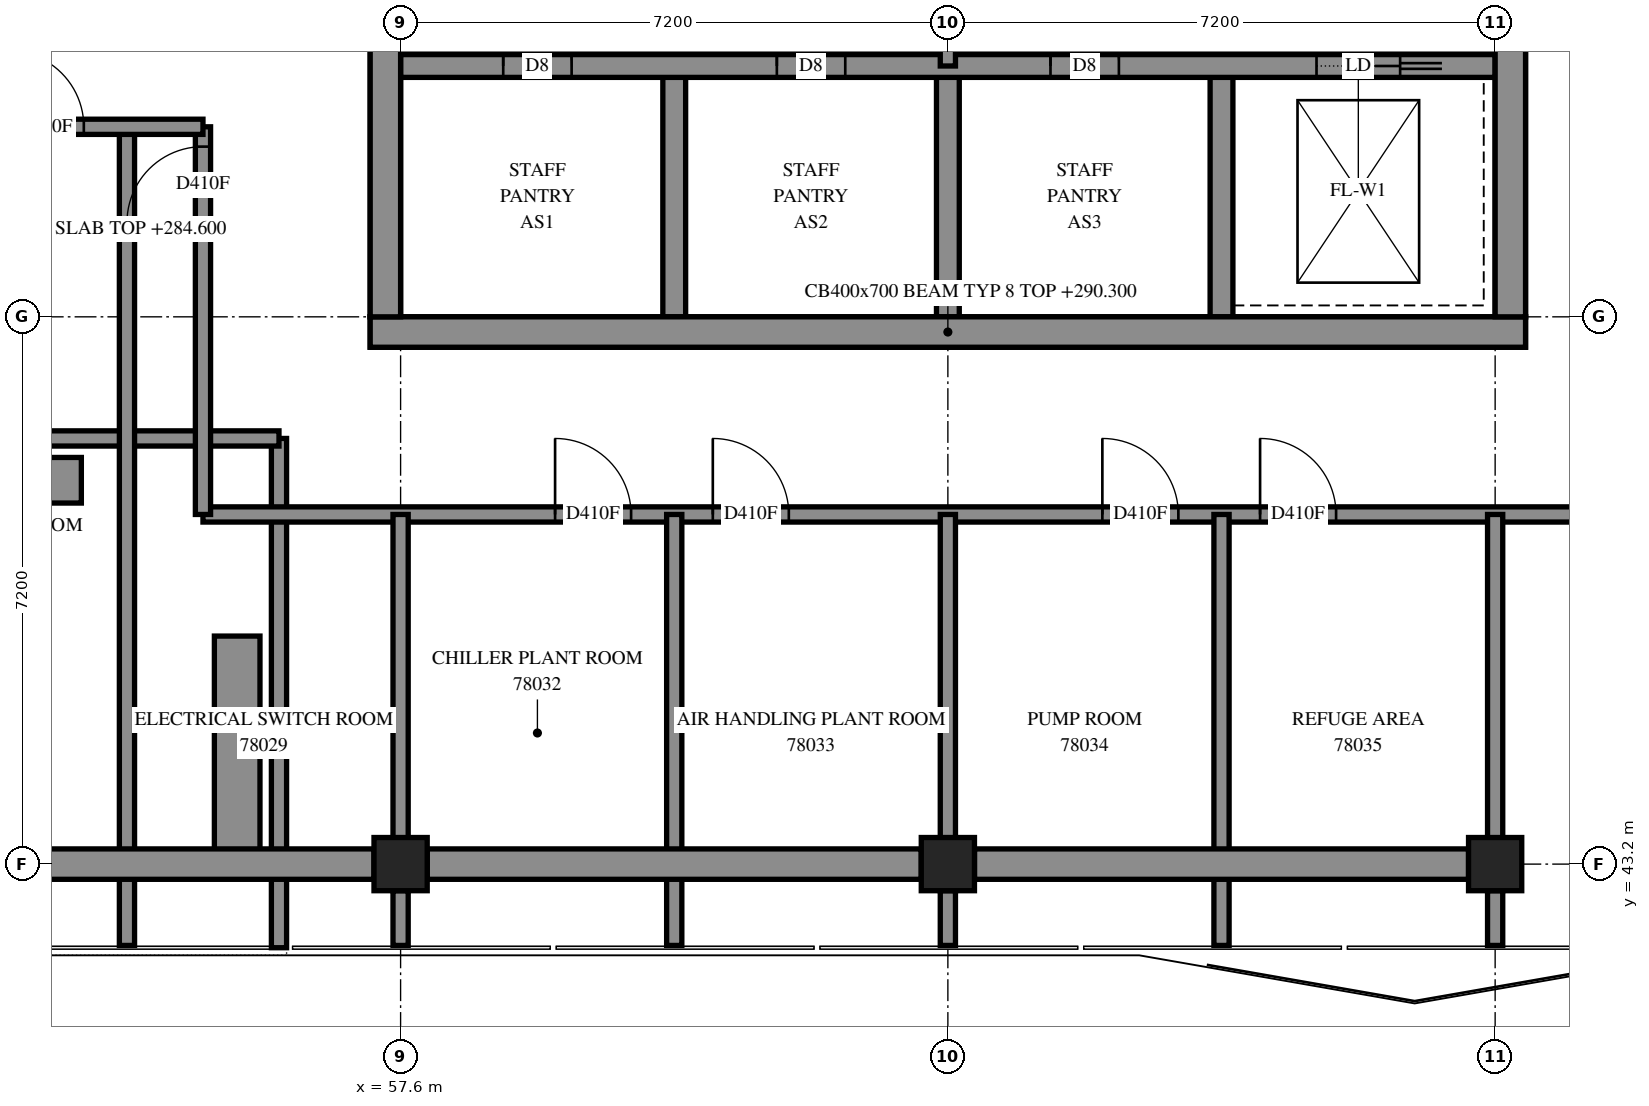
"""IFC4 building model, lengths in metres.
Left out: names, types, materials, properties, quantities, classifications, styles, units other than length and angle.
Written with IfcOpenShell. Run it as: python <this file> out.ifc"""

import sys

from ifc_helpers import new_model, si_unit, direction, frame, frame_2d, origin, origin_2d, place, context, subcontext, project, spatial, polyline, rectangle, outline, extrude, element, fill, save


model = new_model("IFC4")
c1 = context("Model", 3, precision=1e-05, world=origin(), true_north=direction((0.0, 1.0)))
c2 = subcontext(c1, "Body", "Model", "MODEL_VIEW")
j1 = project(units=[si_unit("LENGTHUNIT", "METRE"), si_unit("PLANEANGLEUNIT", "RADIAN")], contexts=[c1])
p1 = place(None, origin())
s1 = spatial("IfcSite", under=j1, at=p1, CompositionType="ELEMENT")
p2 = place(p1, origin())
s2 = spatial("IfcBuilding", under=s1, at=p2, CompositionType="ELEMENT")
p3 = place(p2, frame((0.0, 0.0, 284.6)))
s3 = spatial("IfcBuildingStorey", under=s2, at=p3, CompositionType="ELEMENT", Elevation=284.6)
for number, where, z_axis, x_axis in (
    (1, (57.6, 43.2, 0.0), (0.0, 0.0, 1.0), (1.0, 0.0, 0.0)),
    (2, (64.8, 43.2, 0.0), (0.0, 0.0, 1.0), (1.0, 0.0, 0.0)),
    (3, (72.0, 43.2, 0.0), (0.0, 0.0, 1.0), (1.0, 0.0, 0.0)),
):
    element("IfcColumn", number, at=place(p3, frame(where, z_axis=z_axis, x_axis=x_axis)), inside=s3, PredefinedType="COLUMN", context=c2, shape_type="SweptSolid", body=[
        extrude(rectangle(XDim=0.7, YDim=0.7, at=origin_2d()), origin(), (0.0, 0.0, 1.0), 5.7),
    ])
p4 = place(p3, frame((57.2, 50.2, -0.3), z_axis=(0.0, 0.0, 1.0), x_axis=(1.0, 0.0, 0.0)))
e4 = element("IfcWall", 4, at=p4, inside=s3, PredefinedType="SHEAR", context=c2, shape_type="SweptSolid", body=[
    extrude(rectangle(XDim=15.2, YDim=0.4, at=frame_2d((7.6, 0.0))), origin(), (0.0, 0.0, 1.0), 5.3),
])
p5 = place(p3, frame((57.4, 50.4, -0.3), z_axis=(0.0, 0.0, 1.0), x_axis=(0.0, 1.0, 0.0)))
e5 = element("IfcWall", 5, at=p5, inside=s3, PredefinedType="SHEAR", context=c2, shape_type="SweptSolid", body=[
    extrude(rectangle(XDim=14.4, YDim=0.4, at=frame_2d((7.2, 0.0))), origin(), (0.0, 0.0, 1.0), 5.3),
])
p6 = place(p5, frame((4.55, 0.0, 0.3)))
e6 = element("IfcOpeningElement", 6, at=p6, cuts=e5, PredefinedType="OPENING", context=c2, shape_type="SweptSolid", body=[
    extrude(rectangle(XDim=1.1, YDim=2.1, at=frame_2d((0.55, 1.05))), frame((0.0, 0.21, 0.0), z_axis=(0.0, -1.0, 0.0), x_axis=(1.0, 0.0, 0.0)), (0.0, 0.0, 1.0), 0.42),
])
p7 = place(p5, frame((11.35, 0.0, 0.3)))
e7 = element("IfcOpeningElement", 7, at=p7, cuts=e5, PredefinedType="OPENING", context=c2, shape_type="SweptSolid", body=[
    extrude(rectangle(XDim=1.1, YDim=2.1, at=frame_2d((0.55, 1.05))), frame((0.0, 0.21, 0.0), z_axis=(0.0, -1.0, 0.0), x_axis=(1.0, 0.0, 0.0)), (0.0, 0.0, 1.0), 0.42),
])
p8 = place(p3, frame((72.2, 50.4, -0.3), z_axis=(0.0, 0.0, 1.0), x_axis=(0.0, 1.0, 0.0)))
e8 = element("IfcWall", 8, at=p8, inside=s3, PredefinedType="SHEAR", context=c2, shape_type="SweptSolid", body=[
    extrude(rectangle(XDim=14.4, YDim=0.4, at=frame_2d((7.2, 0.0))), origin(), (0.0, 0.0, 1.0), 5.3),
])
p9 = place(p8, frame((4.55, 0.0, 0.3)))
e9 = element("IfcOpeningElement", 9, at=p9, cuts=e8, PredefinedType="OPENING", context=c2, shape_type="SweptSolid", body=[
    extrude(rectangle(XDim=1.1, YDim=2.1, at=frame_2d((0.55, 1.05))), frame((0.0, 0.21, 0.0), z_axis=(0.0, -1.0, 0.0), x_axis=(1.0, 0.0, 0.0)), (0.0, 0.0, 1.0), 0.42),
])
p10 = place(p8, frame((11.35, 0.0, 0.3)))
e10 = element("IfcOpeningElement", 10, at=p10, cuts=e8, PredefinedType="OPENING", context=c2, shape_type="SweptSolid", body=[
    extrude(rectangle(XDim=1.1, YDim=2.1, at=frame_2d((0.55, 1.05))), frame((0.0, 0.21, 0.0), z_axis=(0.0, -1.0, 0.0), x_axis=(1.0, 0.0, 0.0)), (0.0, 0.0, 1.0), 0.42),
])
for number, where, z_axis, x_axis in (
    (11, (61.2, 50.4, 0.0), (0.0, 0.0, 1.0), (0.0, 1.0, 0.0)),
    (12, (64.8, 50.4, 0.0), (0.0, 0.0, 1.0), (0.0, 1.0, 0.0)),
    (13, (68.4, 50.4, 0.0), (0.0, 0.0, 1.0), (0.0, 1.0, 0.0)),
):
    element("IfcWall", number, at=place(p3, frame(where, z_axis=z_axis, x_axis=x_axis)), inside=s3, PredefinedType="SOLIDWALL", context=c2, shape_type="SweptSolid", body=[
        extrude(rectangle(XDim=3.3, YDim=0.3, at=frame_2d((1.65, 0.0))), origin(), (0.0, 0.0, 1.0), 5.7),
    ])
p11 = place(p3, frame((57.6, 53.7, 0.0), z_axis=(0.0, 0.0, 1.0), x_axis=(1.0, 0.0, 0.0)))
e14 = element("IfcWall", 14, at=p11, inside=s3, PredefinedType="SOLIDWALL", context=c2, shape_type="SweptSolid", body=[
    extrude(rectangle(XDim=14.4, YDim=0.3, at=frame_2d((7.2, 0.0))), origin(), (0.0, 0.0, 1.0), 5.7),
])
p12 = place(p11, frame((1.35, 0.0, 0.0)))
e15 = element("IfcOpeningElement", 15, at=p12, cuts=e14, PredefinedType="OPENING", context=c2, shape_type="SweptSolid", body=[
    extrude(rectangle(XDim=0.9, YDim=2.1, at=frame_2d((0.45, 1.05))), frame((0.0, 0.16, 0.0), z_axis=(0.0, -1.0, 0.0), x_axis=(1.0, 0.0, 0.0)), (0.0, 0.0, 1.0), 0.32),
])
p13 = place(p11, frame((4.95, 0.0, 0.0)))
e16 = element("IfcOpeningElement", 16, at=p13, cuts=e14, PredefinedType="OPENING", context=c2, shape_type="SweptSolid", body=[
    extrude(rectangle(XDim=0.9, YDim=2.1, at=frame_2d((0.45, 1.05))), frame((0.0, 0.16, 0.0), z_axis=(0.0, -1.0, 0.0), x_axis=(1.0, 0.0, 0.0)), (0.0, 0.0, 1.0), 0.32),
])
p14 = place(p11, frame((8.55, 0.0, 0.0)))
e17 = element("IfcOpeningElement", 17, at=p14, cuts=e14, PredefinedType="OPENING", context=c2, shape_type="SweptSolid", body=[
    extrude(rectangle(XDim=0.9, YDim=2.1, at=frame_2d((0.45, 1.05))), frame((0.0, 0.16, 0.0), z_axis=(0.0, -1.0, 0.0), x_axis=(1.0, 0.0, 0.0)), (0.0, 0.0, 1.0), 0.32),
])
p15 = place(p11, frame((12.05, 0.0, 0.0)))
e18 = element("IfcOpeningElement", 18, at=p15, cuts=e14, PredefinedType="OPENING", context=c2, shape_type="SweptSolid", body=[
    extrude(rectangle(XDim=1.1, YDim=2.1, at=frame_2d((0.55, 1.05))), frame((0.0, 0.16, 0.0), z_axis=(0.0, -1.0, 0.0), x_axis=(1.0, 0.0, 0.0)), (0.0, 0.0, 1.0), 0.32),
])
p16 = place(p3, frame((56.0, 42.1, 0.0), z_axis=(0.0, 0.0, 1.0), x_axis=(0.0, 1.0, 0.0)))
e19 = element("IfcWall", 19, at=p16, inside=s3, PredefinedType="PARAPET", context=c2, shape_type="SweptSolid", body=[
    extrude(outline(polyline([(0.0, -0.1), (6.8, -0.1), (6.6, 0.1), (0.0, 0.1), (0.0, -0.1)])), origin(), (0.0, 0.0, 1.0), 0.25),
])
p17 = place(p3, frame((56.0, 48.8, 0.0), z_axis=(0.0, 0.0, 1.0), x_axis=(-1.0, 0.0, 0.0)))
e20 = element("IfcWall", 20, at=p17, inside=s3, PredefinedType="PARAPET", context=c2, shape_type="SweptSolid", body=[
    extrude(outline(polyline([(-0.1, -0.1), (6.7, -0.1), (6.7, 0.1), (0.1, 0.1), (-0.1, -0.1)])), origin(), (0.0, 0.0, 1.0), 0.25),
])
p18 = place(p3, frame((55.45, 43.25, 0.0), z_axis=(0.0, 0.0, 1.0), x_axis=(0.0, 1.0, 0.0)))
e21 = element("IfcWall", 21, at=p18, inside=s3, PredefinedType="SOLIDWALL", context=c2, shape_type="SweptSolid", body=[
    extrude(rectangle(XDim=2.95, YDim=0.6, at=frame_2d((1.475, 0.0))), origin(), (0.0, 0.0, 1.0), 0.65),
])
p19 = place(p3, frame((53.4, 48.25, 0.0), z_axis=(0.0, 0.0, 1.0), x_axis=(-1.0, 0.0, 0.0)))
e22 = element("IfcWall", 22, at=p19, inside=s3, PredefinedType="SOLIDWALL", context=c2, shape_type="SweptSolid", body=[
    extrude(rectangle(XDim=2.58, YDim=0.6, at=frame_2d((1.29, 0.0))), origin(), (0.0, 0.0, 1.0), 0.65),
])
p20 = place(p3, frame((64.8, 53.7, 0.0), z_axis=(0.0, 0.0, 1.0), x_axis=(0.0, 1.0, 0.0)))
e23 = element("IfcWall", 23, at=p20, inside=s3, PredefinedType="PARTITIONING", context=c2, shape_type="SweptSolid", body=[
    extrude(rectangle(XDim=3.6, YDim=0.2, at=frame_2d((1.8, 0.0))), origin(), (0.0, 0.0, 1.0), 5.7),
])
p21 = place(p20, frame((1.25, 0.0, 0.0)))
e24 = element("IfcOpeningElement", 24, at=p21, cuts=e23, PredefinedType="OPENING", context=c2, shape_type="SweptSolid", body=[
    extrude(rectangle(XDim=1.1, YDim=2.1, at=frame_2d((0.55, 1.05))), frame((0.0, 0.11, 0.0), z_axis=(0.0, -1.0, 0.0), x_axis=(1.0, 0.0, 0.0)), (0.0, 0.0, 1.0), 0.22),
])
p22 = place(p3, frame((55.0, 47.8, 0.0), z_axis=(0.0, 0.0, 1.0), x_axis=(1.0, 0.0, 0.0)))
e25 = element("IfcWall", 25, at=p22, inside=s3, PredefinedType="PARTITIONING", context=c2, shape_type="SweptSolid", body=[
    extrude(rectangle(XDim=19.266, YDim=0.2, at=frame_2d((9.633, 0.0))), origin(), (0.0, 0.0, 1.0), 5.7),
])
p23 = place(p22, frame((4.633, 0.0, 0.0)))
e26 = element("IfcOpeningElement", 26, at=p23, cuts=e25, PredefinedType="OPENING", context=c2, shape_type="SweptSolid", body=[
    extrude(rectangle(XDim=1.0, YDim=2.1, at=frame_2d((0.5, 1.05))), frame((0.0, 0.11, 0.0), z_axis=(0.0, -1.0, 0.0), x_axis=(1.0, 0.0, 0.0)), (0.0, 0.0, 1.0), 0.22),
])
p24 = place(p22, frame((6.707, 0.0, 0.0)))
e27 = element("IfcOpeningElement", 27, at=p24, cuts=e25, PredefinedType="OPENING", context=c2, shape_type="SweptSolid", body=[
    extrude(rectangle(XDim=1.0, YDim=2.1, at=frame_2d((0.5, 1.05))), frame((0.0, 0.11, 0.0), z_axis=(0.0, -1.0, 0.0), x_axis=(1.0, 0.0, 0.0)), (0.0, 0.0, 1.0), 0.22),
])
p25 = place(p22, frame((11.832, 0.0, 0.0)))
e28 = element("IfcOpeningElement", 28, at=p25, cuts=e25, PredefinedType="OPENING", context=c2, shape_type="SweptSolid", body=[
    extrude(rectangle(XDim=1.0, YDim=2.1, at=frame_2d((0.5, 1.05))), frame((0.0, 0.11, 0.0), z_axis=(0.0, -1.0, 0.0), x_axis=(1.0, 0.0, 0.0)), (0.0, 0.0, 1.0), 0.22),
])
p26 = place(p22, frame((13.908, 0.0, 0.0)))
e29 = element("IfcOpeningElement", 29, at=p26, cuts=e25, PredefinedType="OPENING", context=c2, shape_type="SweptSolid", body=[
    extrude(rectangle(XDim=1.0, YDim=2.1, at=frame_2d((0.5, 1.05))), frame((0.0, 0.11, 0.0), z_axis=(0.0, -1.0, 0.0), x_axis=(1.0, 0.0, 0.0)), (0.0, 0.0, 1.0), 0.22),
])
p27 = place(p3, frame((54.0, 42.13, 0.0), z_axis=(0.0, 0.0, 1.0), x_axis=(0.0, 1.0, 0.0)))
e30 = element("IfcWall", 30, at=p27, inside=s3, PredefinedType="PARTITIONING", context=c2, shape_type="SweptSolid", body=[
    extrude(rectangle(XDim=10.77, YDim=0.2, at=frame_2d((5.385, 0.0))), origin(), (0.0, 0.0, 1.0), 5.7),
])
for number, where, z_axis, x_axis in (
    (31, (61.2, 42.13, 0.0), (0.0, 0.0, 1.0), (0.0, 1.0, 0.0)),
    (32, (68.4, 42.13, 0.0), (0.0, 0.0, 1.0), (0.0, 1.0, 0.0)),
):
    element("IfcWall", number, at=place(p3, frame(where, z_axis=z_axis, x_axis=x_axis)), inside=s3, PredefinedType="PARTITIONING", context=c2, shape_type="SweptSolid", body=[
        extrude(rectangle(XDim=5.67, YDim=0.2, at=frame_2d((2.835, 0.0))), origin(), (0.0, 0.0, 1.0), 5.7),
    ])
p28 = place(p3, frame((55.0, 47.8, 0.0), z_axis=(0.0, 0.0, 1.0), x_axis=(0.0, 1.0, 0.0)))
e33 = element("IfcWall", 33, at=p28, inside=s3, PredefinedType="PARTITIONING", context=c2, shape_type="SweptSolid", body=[
    extrude(rectangle(XDim=5.1, YDim=0.2, at=frame_2d((2.55, 0.0))), origin(), (0.0, 0.0, 1.0), 5.7),
])
p29 = place(p28, frame((3.839, 0.0, 0.0)))
e34 = element("IfcOpeningElement", 34, at=p29, cuts=e33, PredefinedType="OPENING", context=c2, shape_type="SweptSolid", body=[
    extrude(rectangle(XDim=1.0, YDim=2.1, at=frame_2d((0.5, 1.05))), frame((0.0, 0.11, 0.0), z_axis=(0.0, -1.0, 0.0), x_axis=(1.0, 0.0, 0.0)), (0.0, 0.0, 1.0), 0.22),
])
p30 = place(p3, frame((50.4, 52.9, 0.0), z_axis=(0.0, 0.0, 1.0), x_axis=(1.0, 0.0, 0.0)))
e35 = element("IfcWall", 35, at=p30, inside=s3, PredefinedType="PARTITIONING", context=c2, shape_type="SweptSolid", body=[
    extrude(rectangle(XDim=4.6, YDim=0.2, at=frame_2d((2.3, 0.0))), origin(), (0.0, 0.0, 1.0), 5.7),
])
p31 = place(p30, frame((2.033, 0.0, 0.0)))
e36 = element("IfcOpeningElement", 36, at=p31, cuts=e35, PredefinedType="OPENING", context=c2, shape_type="SweptSolid", body=[
    extrude(rectangle(XDim=1.0, YDim=2.1, at=frame_2d((0.5, 1.05))), frame((0.0, 0.11, 0.0), z_axis=(0.0, -1.0, 0.0), x_axis=(1.0, 0.0, 0.0)), (0.0, 0.0, 1.0), 0.22),
])
for number, where, z_axis, x_axis in (
    (37, (57.6, 42.85, 0.0), (0.0, 0.0, 1.0), (0.0, 1.0, 0.0)),
    (38, (64.8, 42.85, 0.0), (0.0, 0.0, 1.0), (0.0, 1.0, 0.0)),
    (39, (72.0, 42.85, 0.0), (0.0, 0.0, 1.0), (0.0, 1.0, 0.0)),
):
    element("IfcWall", number, at=place(p3, frame(where, z_axis=z_axis, x_axis=x_axis)), inside=s3, PredefinedType="PARTITIONING", context=c2, shape_type="SweptSolid", body=[
        extrude(rectangle(XDim=4.95, YDim=0.2, at=frame_2d((2.475, 0.0))), origin(), (0.0, 0.0, 1.0), 5.7),
    ])
for number, where, z_axis, x_axis in (
    (40, (57.6, 42.13, 0.0), (0.0, 0.0, 1.0), (0.0, 1.0, 0.0)),
    (41, (64.8, 42.13, 0.0), (0.0, 0.0, 1.0), (0.0, 1.0, 0.0)),
    (42, (72.0, 42.13, 0.0), (0.0, 0.0, 1.0), (0.0, 1.0, 0.0)),
):
    element("IfcWall", number, at=place(p3, frame(where, z_axis=z_axis, x_axis=x_axis)), inside=s3, PredefinedType="PARTITIONING", context=c2, shape_type="SweptSolid", body=[
        extrude(rectangle(XDim=0.72, YDim=0.2, at=frame_2d((0.36, 0.0))), origin(), (0.0, 0.0, 1.0), 5.7),
    ])
p32 = place(p12, origin())
e43 = element("IfcDoor", 43, at=p32, inside=s3, OperationType="SINGLE_SWING_LEFT", PredefinedType="DOOR", context=c2, shape_type="SweptSolid", body=[
    extrude(rectangle(XDim=0.9, YDim=2.1, at=frame_2d((0.45, 1.05))), frame((0.0, 0.025, 0.0), z_axis=(0.0, -1.0, 0.0), x_axis=(1.0, 0.0, 0.0)), (0.0, 0.0, 1.0), 0.05),
])
fill(e15, e43)
p33 = place(p13, origin())
e44 = element("IfcDoor", 44, at=p33, inside=s3, OperationType="SINGLE_SWING_LEFT", PredefinedType="DOOR", context=c2, shape_type="SweptSolid", body=[
    extrude(rectangle(XDim=0.9, YDim=2.1, at=frame_2d((0.45, 1.05))), frame((0.0, 0.025, 0.0), z_axis=(0.0, -1.0, 0.0), x_axis=(1.0, 0.0, 0.0)), (0.0, 0.0, 1.0), 0.05),
])
fill(e16, e44)
p34 = place(p14, origin())
e45 = element("IfcDoor", 45, at=p34, inside=s3, OperationType="SINGLE_SWING_LEFT", PredefinedType="DOOR", context=c2, shape_type="SweptSolid", body=[
    extrude(rectangle(XDim=0.9, YDim=2.1, at=frame_2d((0.45, 1.05))), frame((0.0, 0.025, 0.0), z_axis=(0.0, -1.0, 0.0), x_axis=(1.0, 0.0, 0.0)), (0.0, 0.0, 1.0), 0.05),
])
fill(e17, e45)
p35 = place(p15, origin())
e46 = element("IfcDoor", 46, at=p35, inside=s3, OperationType="SLIDING_TO_RIGHT", PredefinedType="DOOR", context=c2, shape_type="SweptSolid", body=[
    extrude(rectangle(XDim=1.1, YDim=2.1, at=frame_2d((0.55, 1.05))), frame((0.0, 0.025, 0.0), z_axis=(0.0, -1.0, 0.0), x_axis=(1.0, 0.0, 0.0)), (0.0, 0.0, 1.0), 0.05),
])
fill(e18, e46)
p36 = place(p31, origin())
e47 = element("IfcDoor", 47, at=p36, inside=s3, OperationType="SINGLE_SWING_LEFT", PredefinedType="DOOR", context=c2, shape_type="SweptSolid", body=[
    extrude(rectangle(XDim=1.0, YDim=2.1, at=frame_2d((0.5, 1.05))), frame((0.0, 0.025, 0.0), z_axis=(0.0, -1.0, 0.0), x_axis=(1.0, 0.0, 0.0)), (0.0, 0.0, 1.0), 0.05),
])
fill(e36, e47)
p37 = place(p29, origin())
e48 = element("IfcDoor", 48, at=p37, inside=s3, OperationType="SINGLE_SWING_RIGHT", PredefinedType="DOOR", context=c2, shape_type="SweptSolid", body=[
    extrude(rectangle(XDim=1.0, YDim=2.1, at=frame_2d((0.5, 1.05))), frame((0.0, 0.025, 0.0), z_axis=(0.0, -1.0, 0.0), x_axis=(1.0, 0.0, 0.0)), (0.0, 0.0, 1.0), 0.05),
])
fill(e34, e48)
p38 = place(p23, origin())
e49 = element("IfcDoor", 49, at=p38, inside=s3, OperationType="SINGLE_SWING_LEFT", PredefinedType="DOOR", context=c2, shape_type="SweptSolid", body=[
    extrude(rectangle(XDim=1.0, YDim=2.1, at=frame_2d((0.5, 1.05))), frame((0.0, 0.025, 0.0), z_axis=(0.0, -1.0, 0.0), x_axis=(1.0, 0.0, 0.0)), (0.0, 0.0, 1.0), 0.05),
])
fill(e26, e49)
p39 = place(p24, origin())
e50 = element("IfcDoor", 50, at=p39, inside=s3, OperationType="SINGLE_SWING_RIGHT", PredefinedType="DOOR", context=c2, shape_type="SweptSolid", body=[
    extrude(rectangle(XDim=1.0, YDim=2.1, at=frame_2d((0.5, 1.05))), frame((0.0, 0.025, 0.0), z_axis=(0.0, -1.0, 0.0), x_axis=(1.0, 0.0, 0.0)), (0.0, 0.0, 1.0), 0.05),
])
fill(e27, e50)
p40 = place(p25, origin())
e51 = element("IfcDoor", 51, at=p40, inside=s3, OperationType="SINGLE_SWING_LEFT", PredefinedType="DOOR", context=c2, shape_type="SweptSolid", body=[
    extrude(rectangle(XDim=1.0, YDim=2.1, at=frame_2d((0.5, 1.05))), frame((0.0, 0.025, 0.0), z_axis=(0.0, -1.0, 0.0), x_axis=(1.0, 0.0, 0.0)), (0.0, 0.0, 1.0), 0.05),
])
fill(e28, e51)
p41 = place(p26, origin())
e52 = element("IfcDoor", 52, at=p41, inside=s3, OperationType="SINGLE_SWING_RIGHT", PredefinedType="DOOR", context=c2, shape_type="SweptSolid", body=[
    extrude(rectangle(XDim=1.0, YDim=2.1, at=frame_2d((0.5, 1.05))), frame((0.0, 0.025, 0.0), z_axis=(0.0, -1.0, 0.0), x_axis=(1.0, 0.0, 0.0)), (0.0, 0.0, 1.0), 0.05),
])
fill(e29, e52)
save(model, sys.argv[1])
